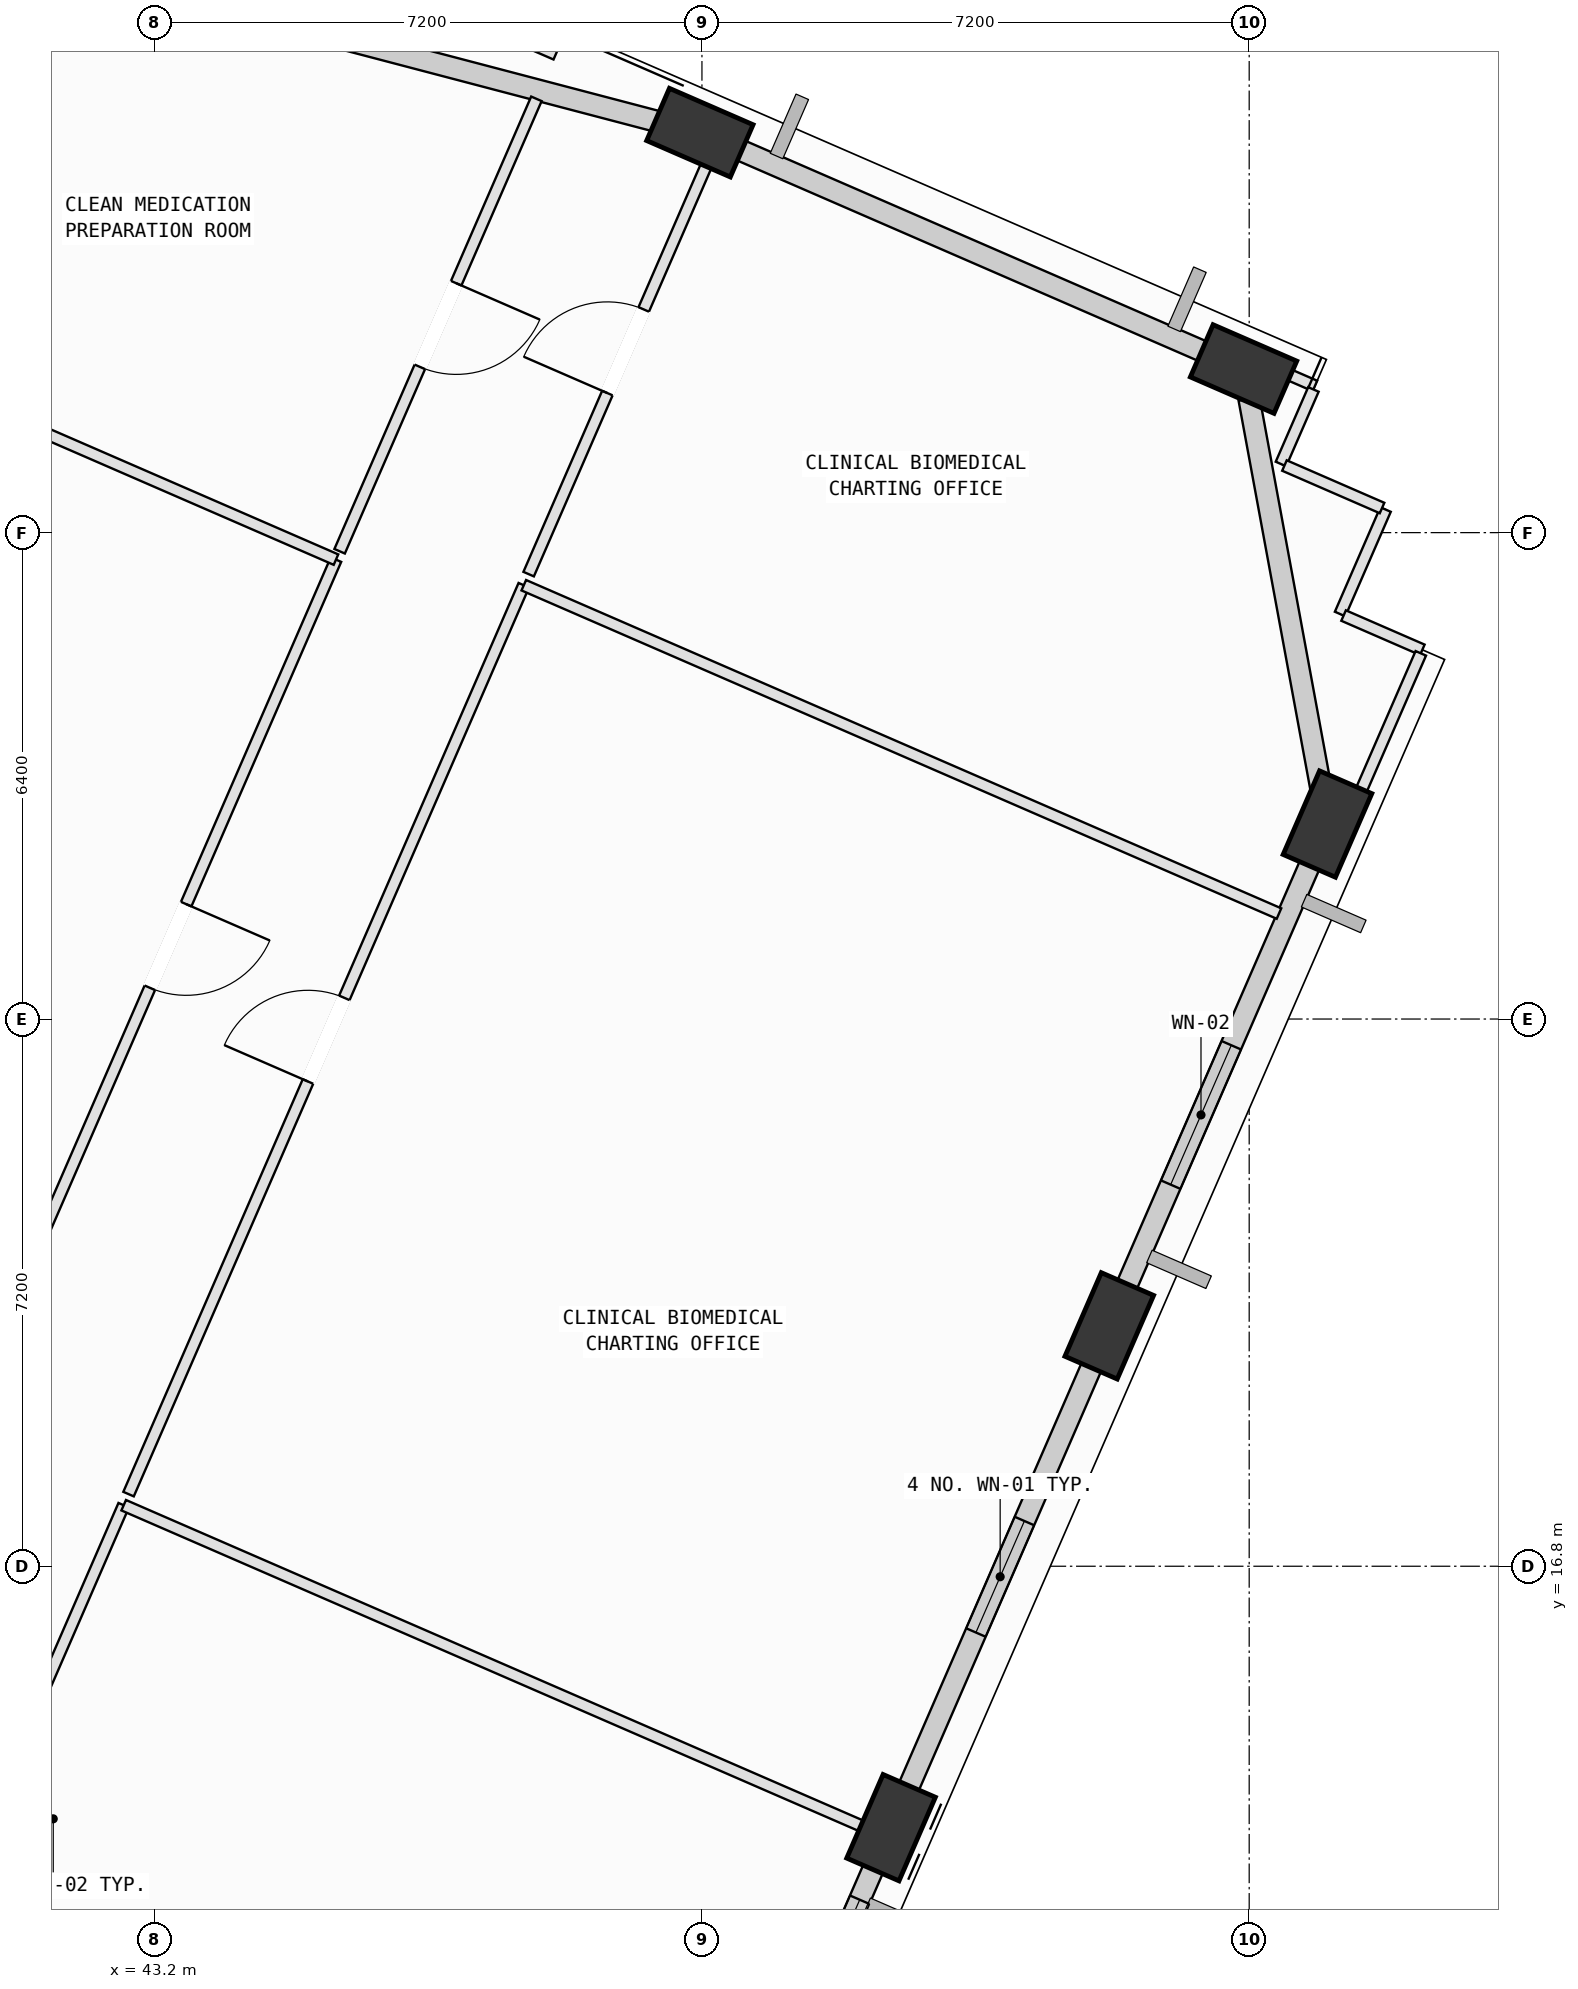
"""IFC4 building model, lengths in metres.
Left out: names, types, materials, properties, quantities, classifications, styles, units other than length and angle.
Written with IfcOpenShell. Run it as: python <this file> out.ifc"""

import sys

from ifc_helpers import new_model, si_unit, direction, frame, frame_2d, origin, origin_2d, place, context, subcontext, project, spatial, rectangle, extrude, element, fill, save


model = new_model("IFC4")
c1 = context("Model", 3, precision=1e-05, world=origin(), true_north=direction((0.0, 1.0)))
c2 = subcontext(c1, "Body", "Model", "MODEL_VIEW")
j1 = project(units=[si_unit("LENGTHUNIT", "METRE"), si_unit("PLANEANGLEUNIT", "RADIAN")], contexts=[c1])
p1 = place(None, origin())
s1 = spatial("IfcSite", under=j1, at=p1, CompositionType="ELEMENT")
p2 = place(p1, origin())
s2 = spatial("IfcBuilding", under=s1, at=p2, CompositionType="ELEMENT")
p3 = place(p2, frame((0.0, 0.0, 316.6)))
s3 = spatial("IfcBuildingStorey", under=s2, at=p3, CompositionType="ELEMENT", Elevation=316.6)
for number, where, z_axis, x_axis in (
    (1, (52.888, 13.36, 0.002), (0.0, 0.0, 1.0), (0.399, 0.917, 0.0)),
    (2, (55.759, 19.963, 0.002), (0.0, 0.0, 1.0), (0.399, 0.917, 0.0)),
    (3, (58.63, 26.566, 0.002), (0.0, 0.0, 1.0), (0.399, 0.917, 0.0)),
    (4, (57.526, 32.553, 0.002), (0.0, 0.0, 1.0), (-0.917, 0.399, 0.0)),
    (5, (50.373, 35.663, 0.002), (0.0, 0.0, 1.0), (-0.917, 0.399, 0.0)),
):
    element("IfcColumn", number, at=place(p3, frame(where, z_axis=z_axis, x_axis=x_axis)), inside=s3, PredefinedType="COLUMN", context=c2, shape_type="SweptSolid", body=[
        extrude(rectangle(XDim=1.2, YDim=0.75, at=origin_2d()), origin(), (0.0, 0.0, 1.0), 3.996),
    ])
p4 = place(p3, frame((52.729, 12.996, 0.0), z_axis=(0.0, 0.0, 1.0), x_axis=(-0.398744230651, -0.917062178112, 0.0)))
e6 = element("IfcWall", 6, at=p4, inside=s3, PredefinedType="SOLIDWALL", context=c2, shape_type="SweptSolid", body=[
    extrude(rectangle(XDim=6.405, YDim=0.28, at=frame_2d((3.203, 0.0))), origin(), (0.0, 0.0, 1.0), 3.245),
])
p5 = place(p4, frame((2.603, 0.0, 0.75)))
e7 = element("IfcOpeningElement", 7, at=p5, cuts=e6, PredefinedType="OPENING", context=c2, shape_type="SweptSolid", body=[
    extrude(rectangle(XDim=1.2, YDim=1.75, at=frame_2d((0.6, 0.875))), frame((0.0, 0.15, 0.0), z_axis=(0.0, -1.0, 0.0), x_axis=(1.0, 0.0, 0.0)), (0.0, 0.0, 1.0), 0.3),
])
p6 = place(p4, frame((0.636, 0.0, 0.75)))
e8 = element("IfcOpeningElement", 8, at=p6, cuts=e6, PredefinedType="OPENING", context=c2, shape_type="SweptSolid", body=[
    extrude(rectangle(XDim=1.2, YDim=1.75, at=frame_2d((0.6, 0.875))), frame((0.0, 0.15, 0.0), z_axis=(0.0, -1.0, 0.0), x_axis=(1.0, 0.0, 0.0)), (0.0, 0.0, 1.0), 0.3),
])
p7 = place(p3, frame((55.601, 19.598, 0.0), z_axis=(0.0, 0.0, 1.0), x_axis=(-0.398744230651, -0.917062178112, 0.0)))
e9 = element("IfcWall", 9, at=p7, inside=s3, PredefinedType="SOLIDWALL", context=c2, shape_type="SweptSolid", body=[
    extrude(rectangle(XDim=6.405, YDim=0.28, at=frame_2d((3.203, 0.0))), origin(), (0.0, 0.0, 1.0), 3.245),
])
p8 = place(p7, frame((2.402, 0.0, 0.75)))
e10 = element("IfcOpeningElement", 10, at=p8, cuts=e9, PredefinedType="OPENING", context=c2, shape_type="SweptSolid", body=[
    extrude(rectangle(XDim=1.6, YDim=1.95, at=frame_2d((0.8, 0.975))), frame((0.0, 0.15, 0.0), z_axis=(0.0, -1.0, 0.0), x_axis=(1.0, 0.0, 0.0)), (0.0, 0.0, 1.0), 0.3),
])
p9 = place(p3, frame((58.472, 26.201, 0.0), z_axis=(0.0, 0.0, 1.0), x_axis=(-0.398776286617, -0.917048239316, 0.0)))
e11 = element("IfcWall", 11, at=p9, inside=s3, PredefinedType="SOLIDWALL", context=c2, shape_type="SweptSolid", body=[
    extrude(rectangle(XDim=6.405, YDim=0.28, at=frame_2d((3.203, 0.0))), origin(), (0.0, 0.0, 1.0), 3.265),
])
p10 = place(p9, frame((2.776, 0.0, 0.75)))
e12 = element("IfcOpeningElement", 12, at=p10, cuts=e11, PredefinedType="OPENING", context=c2, shape_type="SweptSolid", body=[
    extrude(rectangle(XDim=2.0, YDim=1.95, at=frame_2d((1.0, 0.975))), frame((0.0, 0.15, 0.0), z_axis=(0.0, -1.0, 0.0), x_axis=(1.0, 0.0, 0.0)), (0.0, 0.0, 1.0), 0.3),
])
p11 = place(p3, frame((57.598, 32.162, 0.0), z_axis=(0.0, 0.0, 1.0), x_axis=(0.181421889976, -0.983405357845, 0.0)))
e13 = element("IfcWall", 13, at=p11, inside=s3, PredefinedType="SOLIDWALL", context=c2, shape_type="SweptSolid", body=[
    extrude(rectangle(XDim=5.293, YDim=0.28, at=frame_2d((2.646, 0.0))), origin(), (0.0, 0.0, 1.0), 3.265),
])
p12 = place(p3, frame((50.737, 35.504, 0.0), z_axis=(0.0, 0.0, 1.0), x_axis=(0.917057311373, -0.398755423359, 0.0)))
e14 = element("IfcWall", 14, at=p12, inside=s3, PredefinedType="SOLIDWALL", context=c2, shape_type="SweptSolid", body=[
    extrude(rectangle(XDim=7.005, YDim=0.28, at=frame_2d((3.502, 0.0))), origin(), (0.0, 0.0, 1.0), 3.265),
])
p13 = place(p3, frame((41.264, 38.054, 0.0), z_axis=(0.0, 0.0, 1.0), x_axis=(0.967228971308, -0.253905724755, 0.0)))
e15 = element("IfcWall", 15, at=p13, inside=s3, PredefinedType="SOLIDWALL", context=c2, shape_type="SweptSolid", body=[
    extrude(rectangle(XDim=9.02, YDim=0.28, at=frame_2d((4.51, 0.0))), origin(), (0.0, 0.0, 1.0), 3.265),
])
p14 = place(p3, frame((39.48, 9.984, 0.0), z_axis=(0.0, 0.0, 1.0), x_axis=(0.398659488131, 0.917099020021, 0.0)))
e16 = element("IfcWall", 16, at=p14, inside=s3, PredefinedType="PARTITIONING", context=c2, shape_type="SweptSolid", body=[
    extrude(rectangle(XDim=8.308, YDim=0.15, at=frame_2d((4.154, 0.0))), origin(), (0.0, 0.0, 1.0), 3.78),
])
p15 = place(p14, frame((3.554, 0.0, 0.0)))
e17 = element("IfcOpeningElement", 17, at=p15, cuts=e16, PredefinedType="OPENING", context=c2, shape_type="SweptSolid", body=[
    extrude(rectangle(XDim=1.2, YDim=2.15, at=frame_2d((0.6, 1.075))), frame((0.0, 0.085, 0.0), z_axis=(0.0, -1.0, 0.0), x_axis=(1.0, 0.0, 0.0)), (0.0, 0.0, 1.0), 0.17),
])
p16 = place(p3, frame((42.792, 17.603, 0.0), z_axis=(0.0, 0.0, 1.0), x_axis=(0.917063112739, -0.398742081117, 0.0)))
e18 = element("IfcWall", 18, at=p16, inside=s3, PredefinedType="PARTITIONING", context=c2, shape_type="SweptSolid", body=[
    extrude(rectangle(XDim=11.18, YDim=0.15, at=frame_2d((5.59, 0.0))), origin(), (0.0, 0.0, 1.0), 3.78),
])
p17 = place(p3, frame((42.856, 17.749, 0.0), z_axis=(0.0, 0.0, 1.0), x_axis=(0.398751440491, 0.917059043195, 0.0)))
e19 = element("IfcWall", 19, at=p17, inside=s3, PredefinedType="PARTITIONING", context=c2, shape_type="SweptSolid", body=[
    extrude(rectangle(XDim=13.041, YDim=0.15, at=frame_2d((6.52, 0.0))), origin(), (0.0, 0.0, 1.0), 3.78),
])
p18 = place(p17, frame((5.92, 0.0, 0.0)))
e20 = element("IfcOpeningElement", 20, at=p18, cuts=e19, PredefinedType="OPENING", context=c2, shape_type="SweptSolid", body=[
    extrude(rectangle(XDim=1.2, YDim=2.15, at=frame_2d((0.6, 1.075))), frame((0.0, 0.085, 0.0), z_axis=(0.0, -1.0, 0.0), x_axis=(1.0, 0.0, 0.0)), (0.0, 0.0, 1.0), 0.17),
])
p19 = place(p3, frame((48.056, 29.708, 0.0), z_axis=(0.0, 0.0, 1.0), x_axis=(0.917068265028, -0.398730231207, 0.0)))
e21 = element("IfcWall", 21, at=p19, inside=s3, PredefinedType="PARTITIONING", context=c2, shape_type="SweptSolid", body=[
    extrude(rectangle(XDim=10.834, YDim=0.15, at=frame_2d((5.417, 0.0))), origin(), (0.0, 0.0, 1.0), 3.78),
])
p20 = place(p3, frame((56.129, 20.236, 0.0), z_axis=(0.0, 0.0, 1.0), x_axis=(-0.398658726612, -0.91709935105, 0.0)))
e22 = element("IfcWall", 22, at=p20, inside=s3, PredefinedType="PARTITIONING", context=c2, shape_type="SweptSolid", body=[
    extrude(rectangle(XDim=0.795, YDim=0.15, at=frame_2d((0.397, 0.0))), origin(), (0.0, 0.0, 1.0), 3.265),
])
p21 = place(p3, frame((59.394, 30.704, 0.0), z_axis=(0.0, 0.0, 1.0), x_axis=(-0.398904712107, -0.916992383097, 0.0)))
e23 = element("IfcWall", 23, at=p21, inside=s3, PredefinedType="PARTITIONING", context=c2, shape_type="SweptSolid", body=[
    extrude(rectangle(XDim=1.5, YDim=0.15, at=frame_2d((0.75, 0.0))), origin(), (0.0, 0.0, 1.0), 3.78),
])
p22 = place(p3, frame((58.842, 29.309, 0.0), z_axis=(0.0, 0.0, 1.0), x_axis=(0.916815661373, -0.399310709926, 0.0)))
e24 = element("IfcWall", 24, at=p22, inside=s3, PredefinedType="PARTITIONING", context=c2, shape_type="SweptSolid", body=[
    extrude(rectangle(XDim=1.13, YDim=0.15, at=frame_2d((0.565, 0.0))), origin(), (0.0, 0.0, 1.0), 3.78),
])
p23 = place(p3, frame((59.858, 28.812, 0.0), z_axis=(0.0, 0.0, 1.0), x_axis=(-0.399092651862, -0.916910603728, 0.0)))
e25 = element("IfcWall", 25, at=p23, inside=s3, PredefinedType="PARTITIONING", context=c2, shape_type="SweptSolid", body=[
    extrude(rectangle(XDim=2.947, YDim=0.15, at=frame_2d((1.473, 0.0))), origin(), (0.0, 0.0, 1.0), 3.265),
])
p24 = place(p3, frame((48.12, 29.854, 0.0), z_axis=(0.0, 0.0, 1.0), x_axis=(0.398700984872, 0.917080980428, 0.0)))
e26 = element("IfcWall", 26, at=p24, inside=s3, PredefinedType="PARTITIONING", context=c2, shape_type="SweptSolid", body=[
    extrude(rectangle(XDim=6.395, YDim=0.15, at=frame_2d((3.198, 0.0))), origin(), (0.0, 0.0, 1.0), 2.765),
])
p25 = place(p24, frame((2.598, 0.0, 0.0)))
e27 = element("IfcOpeningElement", 27, at=p25, cuts=e26, PredefinedType="OPENING", context=c2, shape_type="SweptSolid", body=[
    extrude(rectangle(XDim=1.2, YDim=2.15, at=frame_2d((0.6, 1.075))), frame((0.0, 0.085, 0.0), z_axis=(0.0, -1.0, 0.0), x_axis=(1.0, 0.0, 0.0)), (0.0, 0.0, 1.0), 0.17),
])
p26 = place(p3, frame((57.229, 32.867, 0.0), z_axis=(0.0, 0.0, 1.0), x_axis=(0.917222637379, -0.398374991032, 0.0)))
e28 = element("IfcWall", 28, at=p26, inside=s3, PredefinedType="PARTITIONING", context=c2, shape_type="SweptSolid", body=[
    extrude(rectangle(XDim=1.348, YDim=0.15, at=frame_2d((0.674, 0.0))), origin(), (0.0, 0.0, 1.0), 3.265),
])
p27 = place(p3, frame((58.445, 32.284, 0.0), z_axis=(0.0, 0.0, 1.0), x_axis=(-0.39911825621, -0.916899458807, 0.0)))
e29 = element("IfcWall", 29, at=p27, inside=s3, PredefinedType="PARTITIONING", context=c2, shape_type="SweptSolid", body=[
    extrude(rectangle(XDim=1.07, YDim=0.15, at=frame_2d((0.535, 0.0))), origin(), (0.0, 0.0, 1.0), 3.78),
])
p28 = place(p3, frame((58.064, 31.283, 0.0), z_axis=(0.0, 0.0, 1.0), x_axis=(0.91691198731, -0.399089473085, 0.0)))
e30 = element("IfcWall", 30, at=p28, inside=s3, PredefinedType="PARTITIONING", context=c2, shape_type="SweptSolid", body=[
    extrude(rectangle(XDim=1.4, YDim=0.15, at=frame_2d((0.7, 0.0))), origin(), (0.0, 0.0, 1.0), 3.78),
])
p29 = place(p3, frame((45.585, 30.045, 0.0), z_axis=(0.0, 0.0, 1.0), x_axis=(-0.398687458661, -0.91708686083, 0.0)))
e31 = element("IfcWall", 31, at=p29, inside=s3, PredefinedType="PARTITIONING", context=c2, shape_type="SweptSolid", body=[
    extrude(rectangle(XDim=11.086, YDim=0.15, at=frame_2d((5.543, 0.0))), origin(), (0.0, 0.0, 1.0), 2.765),
])
p30 = place(p29, frame((4.943, 0.0, 0.0)))
e32 = element("IfcOpeningElement", 32, at=p30, cuts=e31, PredefinedType="OPENING", context=c2, shape_type="SweptSolid", body=[
    extrude(rectangle(XDim=1.2, YDim=2.15, at=frame_2d((0.6, 1.075))), frame((0.0, 0.085, 0.0), z_axis=(0.0, -1.0, 0.0), x_axis=(1.0, 0.0, 0.0)), (0.0, 0.0, 1.0), 0.17),
])
p31 = place(p3, frame((38.767, 33.01, 0.0), z_axis=(0.0, 0.0, 1.0), x_axis=(0.917030896956, -0.398816165707, 0.0)))
e33 = element("IfcWall", 33, at=p31, inside=s3, PredefinedType="PARTITIONING", context=c2, shape_type="SweptSolid", body=[
    extrude(rectangle(XDim=7.435, YDim=0.15, at=frame_2d((3.717, 0.0))), origin(), (0.0, 0.0, 1.0), 3.78),
])
p32 = place(p3, frame((42.424, 39.326, 0.0), z_axis=(0.0, 0.0, 1.0), x_axis=(0.917064175576, -0.3987396367, 0.0)))
e34 = element("IfcWall", 34, at=p32, inside=s3, PredefinedType="PARTITIONING", context=c2, shape_type="SweptSolid", body=[
    extrude(rectangle(XDim=6.6, YDim=0.15, at=frame_2d((3.3, 0.0))), origin(), (0.0, 0.0, 1.0), 3.78),
])
p33 = place(p3, frame((48.222, 36.108, 0.0), z_axis=(0.0, 0.0, 1.0), x_axis=(-0.398811373886, -0.9170329809, 0.0)))
e35 = element("IfcWall", 35, at=p33, inside=s3, PredefinedType="PARTITIONING", context=c2, shape_type="SweptSolid", body=[
    extrude(rectangle(XDim=6.491, YDim=0.15, at=frame_2d((3.246, 0.0))), origin(), (0.0, 0.0, 1.0), 2.765),
])
p34 = place(p33, frame((2.646, 0.0, 0.0)))
e36 = element("IfcOpeningElement", 36, at=p34, cuts=e35, PredefinedType="OPENING", context=c2, shape_type="SweptSolid", body=[
    extrude(rectangle(XDim=1.2, YDim=2.15, at=frame_2d((0.6, 1.075))), frame((0.0, 0.085, 0.0), z_axis=(0.0, -1.0, 0.0), x_axis=(1.0, 0.0, 0.0)), (0.0, 0.0, 1.0), 0.17),
])
p35 = place(p6, origin())
e37 = element("IfcWindow", 37, at=p35, inside=s3, PartitioningType="SINGLE_PANEL", PredefinedType="WINDOW", context=c2, shape_type="SweptSolid", body=[
    extrude(rectangle(XDim=1.2, YDim=1.75, at=frame_2d((0.6, 0.875))), frame((0.0, 0.03, 0.0), z_axis=(0.0, -1.0, 0.0), x_axis=(1.0, 0.0, 0.0)), (0.0, 0.0, 1.0), 0.06),
])
fill(e8, e37)
p36 = place(p8, origin())
e38 = element("IfcWindow", 38, at=p36, inside=s3, PartitioningType="SINGLE_PANEL", PredefinedType="WINDOW", context=c2, shape_type="SweptSolid", body=[
    extrude(rectangle(XDim=1.6, YDim=1.95, at=frame_2d((0.8, 0.975))), frame((0.0, 0.03, 0.0), z_axis=(0.0, -1.0, 0.0), x_axis=(1.0, 0.0, 0.0)), (0.0, 0.0, 1.0), 0.06),
])
fill(e10, e38)
p37 = place(p10, origin())
e39 = element("IfcWindow", 39, at=p37, inside=s3, PartitioningType="SINGLE_PANEL", PredefinedType="WINDOW", context=c2, shape_type="SweptSolid", body=[
    extrude(rectangle(XDim=2.0, YDim=1.95, at=frame_2d((1.0, 0.975))), frame((0.0, 0.03, 0.0), z_axis=(0.0, -1.0, 0.0), x_axis=(1.0, 0.0, 0.0)), (0.0, 0.0, 1.0), 0.06),
])
fill(e12, e39)
p38 = place(p18, origin())
e40 = element("IfcDoor", 40, at=p38, inside=s3, OperationType="SINGLE_SWING_LEFT", PredefinedType="DOOR", context=c2, shape_type="SweptSolid", body=[
    extrude(rectangle(XDim=1.2, YDim=2.15, at=frame_2d((0.6, 1.075))), frame((0.0, 0.025, 0.0), z_axis=(0.0, -1.0, 0.0), x_axis=(1.0, 0.0, 0.0)), (0.0, 0.0, 1.0), 0.05),
])
fill(e20, e40)
p39 = place(p25, origin())
e41 = element("IfcDoor", 41, at=p39, inside=s3, OperationType="SINGLE_SWING_LEFT", PredefinedType="DOOR", context=c2, shape_type="SweptSolid", body=[
    extrude(rectangle(XDim=1.2, YDim=2.15, at=frame_2d((0.6, 1.075))), frame((0.0, 0.025, 0.0), z_axis=(0.0, -1.0, 0.0), x_axis=(1.0, 0.0, 0.0)), (0.0, 0.0, 1.0), 0.05),
])
fill(e27, e41)
p40 = place(p30, origin())
e42 = element("IfcDoor", 42, at=p40, inside=s3, OperationType="SINGLE_SWING_LEFT", PredefinedType="DOOR", context=c2, shape_type="SweptSolid", body=[
    extrude(rectangle(XDim=1.2, YDim=2.15, at=frame_2d((0.6, 1.075))), frame((0.0, 0.025, 0.0), z_axis=(0.0, -1.0, 0.0), x_axis=(1.0, 0.0, 0.0)), (0.0, 0.0, 1.0), 0.05),
])
fill(e32, e42)
p41 = place(p34, origin())
e43 = element("IfcDoor", 43, at=p41, inside=s3, OperationType="SINGLE_SWING_LEFT", PredefinedType="DOOR", context=c2, shape_type="SweptSolid", body=[
    extrude(rectangle(XDim=1.2, YDim=2.15, at=frame_2d((0.6, 1.075))), frame((0.0, 0.025, 0.0), z_axis=(0.0, -1.0, 0.0), x_axis=(1.0, 0.0, 0.0)), (0.0, 0.0, 1.0), 0.05),
])
fill(e36, e43)
save(model, sys.argv[1])
